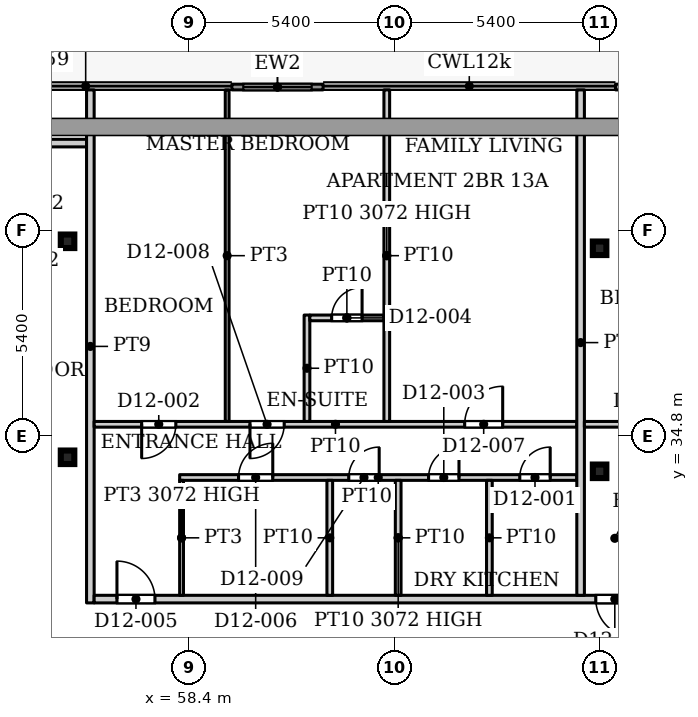
"""IFC4 building model, lengths in metres.
Left out: names, types, materials, properties, quantities, classifications, styles, units other than length and angle.
Written with IfcOpenShell. Run it as: python <this file> out.ifc"""

import sys

from ifc_helpers import new_model, si_unit, direction, frame, frame_2d, origin, origin_2d, place, context, subcontext, project, spatial, rectangle, hollow_rectangle, extrude, source, transform, mapped, element, fill, save


model = new_model("IFC4")
c1 = context("Model", 3, precision=1e-05, world=origin(), true_north=direction((0.0, 1.0)))
c2 = subcontext(c1, "Body", "Model", "MODEL_VIEW")
j1 = project(units=[si_unit("LENGTHUNIT", "METRE"), si_unit("PLANEANGLEUNIT", "RADIAN")], contexts=[c1])
p1 = place(None, origin())
s1 = spatial("IfcSite", under=j1, at=p1, CompositionType="ELEMENT")
p2 = place(p1, origin())
s2 = spatial("IfcBuilding", under=s1, at=p2, CompositionType="ELEMENT")
p3 = place(p2, frame((0.0, 0.0, 57.8)))
s3 = spatial("IfcBuildingStorey", under=s2, at=p3, CompositionType="ELEMENT", Elevation=57.8)
for number, where, z_axis, x_axis in (
    (1, (69.2, 33.863, 0.0), (0.0, 0.0, 1.0), (1.0, 0.0, 0.0)),
    (2, (55.2, 34.232, 0.0), (0.0, 0.0, 1.0), (1.0, 0.0, 0.0)),
    (3, (69.2, 39.732, 0.0), (0.0, 0.0, 1.0), (1.0, 0.0, 0.0)),
    (4, (55.2, 39.916, 0.0), (0.0, 0.0, 1.0), (1.0, 0.0, 0.0)),
):
    element("IfcColumn", number, at=place(p3, frame(where, z_axis=z_axis, x_axis=x_axis)), inside=s3, PredefinedType="COLUMN", context=c2, shape_type="SweptSolid", body=[
        extrude(hollow_rectangle(XDim=0.356, YDim=0.356, WallThickness=0.016, InnerFilletRadius=0.016, OuterFilletRadius=0.032, at=origin_2d()), origin(), (0.0, 0.0, 1.0), 3.9),
    ])
p4 = place(p3, frame((59.524, 43.975, 0.0), z_axis=(0.0, 0.0, 1.0), x_axis=(1.0, 0.0, 0.0)))
e5 = element("IfcWall", 5, at=p4, inside=s3, PredefinedType="SOLIDWALL", context=c2, shape_type="SweptSolid", body=[
    extrude(rectangle(XDim=2.4, YDim=0.15, at=frame_2d((1.2, 0.0))), origin(), (0.0, 0.0, 1.0), 3.75),
])
p5 = place(p4, frame((0.3, 0.0, 0.0)))
e6 = element("IfcOpeningElement", 6, at=p5, cuts=e5, PredefinedType="OPENING", context=c2, shape_type="SweptSolid", body=[
    extrude(rectangle(XDim=1.8, YDim=2.4, at=frame_2d((0.9, 1.2))), frame((0.0, 0.085, 0.0), z_axis=(0.0, -1.0, 0.0), x_axis=(1.0, 0.0, 0.0)), (0.0, 0.0, 1.0), 0.17),
])
p6 = place(p3, frame((69.618, 43.975, 0.0), z_axis=(0.0, 0.0, 1.0), x_axis=(1.0, 0.0, 0.0)))
e7 = element("IfcWall", 7, at=p6, inside=s3, PredefinedType="SOLIDWALL", context=c2, shape_type="SweptSolid", body=[
    extrude(rectangle(XDim=2.4, YDim=0.15, at=frame_2d((1.2, 0.0))), origin(), (0.0, 0.0, 1.0), 3.75),
])
p7 = place(p6, frame((0.3, 0.0, 0.0)))
e8 = element("IfcOpeningElement", 8, at=p7, cuts=e7, PredefinedType="OPENING", context=c2, shape_type="SweptSolid", body=[
    extrude(rectangle(XDim=1.8, YDim=2.4, at=frame_2d((0.9, 1.2))), frame((0.0, 0.085, 0.0), z_axis=(0.0, -1.0, 0.0), x_axis=(1.0, 0.0, 0.0)), (0.0, 0.0, 1.0), 0.17),
])
p8 = place(p3, frame((53.5, 42.5, 0.0), z_axis=(0.0, 0.0, 1.0), x_axis=(1.0, 0.0, 0.0)))
e9 = element("IfcWall", 9, at=p8, inside=s3, PredefinedType="PARTITIONING", context=c2, shape_type="SweptSolid", body=[
    extrude(rectangle(XDim=2.2, YDim=0.2, at=frame_2d((1.1, 0.0))), origin(), (0.0, 0.0, 1.0), 3.6),
])
p9 = place(p8, frame((0.15, 0.0, 0.0)))
e10 = element("IfcOpeningElement", 10, at=p9, cuts=e9, PredefinedType="OPENING", context=c2, shape_type="SweptSolid", body=[
    extrude(rectangle(XDim=1.0, YDim=2.1, at=frame_2d((0.5, 1.05))), frame((0.0, 0.11, 0.0), z_axis=(0.0, -1.0, 0.0), x_axis=(1.0, 0.0, 0.0)), (0.0, 0.0, 1.0), 0.22),
])
p10 = place(p3, frame((55.8, 30.4, 0.0), z_axis=(0.0, 0.0, 1.0), x_axis=(0.0, 1.0, 0.0)))
e11 = element("IfcWall", 11, at=p10, inside=s3, PredefinedType="PARTITIONING", context=c2, shape_type="SweptSolid", body=[
    extrude(rectangle(XDim=13.5, YDim=0.2, at=frame_2d((6.75, 0.0))), origin(), (0.0, 0.0, 1.0), 3.6),
])
p11 = place(p3, frame((55.9, 30.5, 0.0), z_axis=(0.0, 0.0, 1.0), x_axis=(1.0, 0.0, 0.0)))
e12 = element("IfcWall", 12, at=p11, inside=s3, PredefinedType="PARTITIONING", context=c2, shape_type="SweptSolid", body=[
    extrude(rectangle(XDim=42.2, YDim=0.2, at=frame_2d((21.1, 0.0))), origin(), (0.0, 0.0, 1.0), 3.6),
])
p12 = place(p11, frame((0.6, 0.0, 0.0)))
e13 = element("IfcOpeningElement", 13, at=p12, cuts=e12, PredefinedType="OPENING", context=c2, shape_type="SweptSolid", body=[
    extrude(rectangle(XDim=1.0, YDim=2.1, at=frame_2d((0.5, 1.05))), frame((0.0, 0.11, 0.0), z_axis=(0.0, -1.0, 0.0), x_axis=(1.0, 0.0, 0.0)), (0.0, 0.0, 1.0), 0.22),
])
p13 = place(p11, frame((13.2, 0.0, 0.0)))
e14 = element("IfcOpeningElement", 14, at=p13, cuts=e12, PredefinedType="OPENING", context=c2, shape_type="SweptSolid", body=[
    extrude(rectangle(XDim=1.0, YDim=2.1, at=frame_2d((0.5, 1.05))), frame((0.0, 0.11, 0.0), z_axis=(0.0, -1.0, 0.0), x_axis=(1.0, 0.0, 0.0)), (0.0, 0.0, 1.0), 0.22),
])
p14 = place(p11, frame((22.8, 0.0, 0.0)))
e15 = element("IfcOpeningElement", 15, at=p14, cuts=e12, PredefinedType="OPENING", context=c2, shape_type="SweptSolid", body=[
    extrude(rectangle(XDim=1.0, YDim=2.1, at=frame_2d((0.5, 1.05))), frame((0.0, 0.11, 0.0), z_axis=(0.0, -1.0, 0.0), x_axis=(1.0, 0.0, 0.0)), (0.0, 0.0, 1.0), 0.22),
])
p15 = place(p11, frame((34.65, 0.0, 0.0)))
e16 = element("IfcOpeningElement", 16, at=p15, cuts=e12, PredefinedType="OPENING", context=c2, shape_type="SweptSolid", body=[
    extrude(rectangle(XDim=1.0, YDim=2.1, at=frame_2d((0.5, 1.05))), frame((0.0, 0.11, 0.0), z_axis=(0.0, -1.0, 0.0), x_axis=(1.0, 0.0, 0.0)), (0.0, 0.0, 1.0), 0.22),
])
p16 = place(p3, frame((55.9, 35.1, 0.0), z_axis=(0.0, 0.0, 1.0), x_axis=(1.0, 0.0, 0.0)))
e17 = element("IfcWall", 17, at=p16, inside=s3, PredefinedType="PARTITIONING", context=c2, shape_type="SweptSolid", body=[
    extrude(rectangle(XDim=12.7, YDim=0.15, at=frame_2d((6.35, 0.0))), origin(), (0.0, 0.0, 1.0), 3.6),
])
p17 = place(p16, frame((1.25, 0.0, 0.0)))
e18 = element("IfcOpeningElement", 18, at=p17, cuts=e17, PredefinedType="OPENING", context=c2, shape_type="SweptSolid", body=[
    extrude(rectangle(XDim=0.9, YDim=2.1, at=frame_2d((0.45, 1.05))), frame((0.0, 0.085, 0.0), z_axis=(0.0, -1.0, 0.0), x_axis=(1.0, 0.0, 0.0)), (0.0, 0.0, 1.0), 0.17),
])
p18 = place(p16, frame((9.75, 0.0, 0.0)))
e19 = element("IfcOpeningElement", 19, at=p18, cuts=e17, PredefinedType="OPENING", context=c2, shape_type="SweptSolid", body=[
    extrude(rectangle(XDim=1.0, YDim=2.1, at=frame_2d((0.5, 1.05))), frame((0.0, 0.085, 0.0), z_axis=(0.0, -1.0, 0.0), x_axis=(1.0, 0.0, 0.0)), (0.0, 0.0, 1.0), 0.17),
])
p19 = place(p16, frame((4.1, 0.0, 0.0)))
e20 = element("IfcOpeningElement", 20, at=p19, cuts=e17, PredefinedType="OPENING", context=c2, shape_type="SweptSolid", body=[
    extrude(rectangle(XDim=0.9, YDim=2.1, at=frame_2d((0.45, 1.05))), frame((0.0, 0.085, 0.0), z_axis=(0.0, -1.0, 0.0), x_axis=(1.0, 0.0, 0.0)), (0.0, 0.0, 1.0), 0.17),
])
p20 = place(p3, frame((58.15, 33.7, 0.0), z_axis=(0.0, 0.0, 1.0), x_axis=(1.0, 0.0, 0.0)))
e21 = element("IfcWall", 21, at=p20, inside=s3, PredefinedType="PARTITIONING", context=c2, shape_type="SweptSolid", body=[
    extrude(rectangle(XDim=10.45, YDim=0.15, at=frame_2d((5.225, 0.0))), origin(), (0.0, 0.0, 1.0), 3.6),
])
p21 = place(p20, frame((8.95, 0.0, 0.0)))
e22 = element("IfcOpeningElement", 22, at=p21, cuts=e21, PredefinedType="OPENING", context=c2, shape_type="SweptSolid", body=[
    extrude(rectangle(XDim=0.8, YDim=2.1, at=frame_2d((0.4, 1.05))), frame((0.0, 0.085, 0.0), z_axis=(0.0, -1.0, 0.0), x_axis=(1.0, 0.0, 0.0)), (0.0, 0.0, 1.0), 0.17),
])
p22 = place(p20, frame((6.55, 0.0, 0.0)))
e23 = element("IfcOpeningElement", 23, at=p22, cuts=e21, PredefinedType="OPENING", context=c2, shape_type="SweptSolid", body=[
    extrude(rectangle(XDim=0.8, YDim=2.1, at=frame_2d((0.4, 1.05))), frame((0.0, 0.085, 0.0), z_axis=(0.0, -1.0, 0.0), x_axis=(1.0, 0.0, 0.0)), (0.0, 0.0, 1.0), 0.17),
])
p23 = place(p20, frame((1.55, 0.0, 0.0)))
e24 = element("IfcOpeningElement", 24, at=p23, cuts=e21, PredefinedType="OPENING", context=c2, shape_type="SweptSolid", body=[
    extrude(rectangle(XDim=0.9, YDim=2.1, at=frame_2d((0.45, 1.05))), frame((0.0, 0.085, 0.0), z_axis=(0.0, -1.0, 0.0), x_axis=(1.0, 0.0, 0.0)), (0.0, 0.0, 1.0), 0.17),
])
p24 = place(p20, frame((4.45, 0.0, 0.0)))
e25 = element("IfcOpeningElement", 25, at=p24, cuts=e21, PredefinedType="OPENING", context=c2, shape_type="SweptSolid", body=[
    extrude(rectangle(XDim=0.8, YDim=2.1, at=frame_2d((0.4, 1.05))), frame((0.0, 0.085, 0.0), z_axis=(0.0, -1.0, 0.0), x_axis=(1.0, 0.0, 0.0)), (0.0, 0.0, 1.0), 0.17),
])
p25 = place(p3, frame((58.2, 30.6, 0.0), z_axis=(0.0, 0.0, 1.0), x_axis=(0.0, 1.0, 0.0)))
e26 = element("IfcWall", 26, at=p25, inside=s3, PredefinedType="PARTITIONING", context=c2, shape_type="SweptSolid", body=[
    extrude(rectangle(XDim=3.025, YDim=0.1, at=frame_2d((1.512, 0.0))), origin(), (0.0, 0.0, 1.0), 3.072),
])
p26 = place(p3, frame((59.4, 35.175, 0.0), z_axis=(0.0, 0.0, 1.0), x_axis=(0.0, 1.0, 0.0)))
e27 = element("IfcWall", 27, at=p26, inside=s3, PredefinedType="PARTITIONING", context=c2, shape_type="SweptSolid", body=[
    extrude(rectangle(XDim=8.725, YDim=0.1, at=frame_2d((4.362, 0.0))), origin(), (0.0, 0.0, 1.0), 3.6),
])
p27 = place(p3, frame((61.5, 35.175, 0.0), z_axis=(0.0, 0.0, 1.0), x_axis=(0.0, 1.0, 0.0)))
e28 = element("IfcWall", 28, at=p27, inside=s3, PredefinedType="PARTITIONING", context=c2, shape_type="SweptSolid", body=[
    extrude(rectangle(XDim=2.8, YDim=0.15, at=frame_2d((1.4, 0.0))), origin(), (0.0, 0.0, 1.0), 3.6),
])
p28 = place(p3, frame((61.575, 37.9, 0.0), z_axis=(0.0, 0.0, 1.0), x_axis=(1.0, 0.0, 0.0)))
e29 = element("IfcWall", 29, at=p28, inside=s3, PredefinedType="PARTITIONING", context=c2, shape_type="SweptSolid", body=[
    extrude(rectangle(XDim=1.95, YDim=0.15, at=frame_2d((0.975, 0.0))), origin(), (0.0, 0.0, 1.0), 3.6),
])
p29 = place(p28, frame((0.575, 0.0, 0.0)))
e30 = element("IfcOpeningElement", 30, at=p29, cuts=e29, PredefinedType="OPENING", context=c2, shape_type="SweptSolid", body=[
    extrude(rectangle(XDim=0.8, YDim=2.1, at=frame_2d((0.4, 1.05))), frame((0.0, 0.085, 0.0), z_axis=(0.0, -1.0, 0.0), x_axis=(1.0, 0.0, 0.0)), (0.0, 0.0, 1.0), 0.17),
])
p30 = place(p3, frame((62.1, 30.6, 0.0), z_axis=(0.0, 0.0, 1.0), x_axis=(0.0, 1.0, 0.0)))
e31 = element("IfcWall", 31, at=p30, inside=s3, PredefinedType="PARTITIONING", context=c2, shape_type="SweptSolid", body=[
    extrude(rectangle(XDim=3.025, YDim=0.15, at=frame_2d((1.512, 0.0))), origin(), (0.0, 0.0, 1.0), 3.6),
])
p31 = place(p3, frame((63.6, 35.175, 0.0), z_axis=(0.0, 0.0, 1.0), x_axis=(0.0, 1.0, 0.0)))
e32 = element("IfcWall", 32, at=p31, inside=s3, PredefinedType="PARTITIONING", context=c2, shape_type="SweptSolid", body=[
    extrude(rectangle(XDim=8.725, YDim=0.15, at=frame_2d((4.362, 0.0))), origin(), (0.0, 0.0, 1.0), 3.072),
])
p32 = place(p3, frame((63.9, 30.6, 0.0), z_axis=(0.0, 0.0, 1.0), x_axis=(0.0, 1.0, 0.0)))
e33 = element("IfcWall", 33, at=p32, inside=s3, PredefinedType="PARTITIONING", context=c2, shape_type="SweptSolid", body=[
    extrude(rectangle(XDim=3.025, YDim=0.15, at=frame_2d((1.512, 0.0))), origin(), (0.0, 0.0, 1.0), 3.072),
])
p33 = place(p3, frame((66.3, 30.6, 0.0), z_axis=(0.0, 0.0, 1.0), x_axis=(0.0, 1.0, 0.0)))
e34 = element("IfcWall", 34, at=p33, inside=s3, PredefinedType="PARTITIONING", context=c2, shape_type="SweptSolid", body=[
    extrude(rectangle(XDim=3.025, YDim=0.15, at=frame_2d((1.512, 0.0))), origin(), (0.0, 0.0, 1.0), 3.6),
])
p34 = place(p3, frame((68.7, 30.6, 0.0), z_axis=(0.0, 0.0, 1.0), x_axis=(0.0, 1.0, 0.0)))
e35 = element("IfcWall", 35, at=p34, inside=s3, PredefinedType="PARTITIONING", context=c2, shape_type="SweptSolid", body=[
    extrude(rectangle(XDim=13.3, YDim=0.2, at=frame_2d((6.65, 0.0))), origin(), (0.0, 0.0, 1.0), 3.6),
])
p35 = place(p3, frame((68.8, 35.1, 0.0), z_axis=(0.0, 0.0, 1.0), x_axis=(1.0, 0.0, 0.0)))
e36 = element("IfcWall", 36, at=p35, inside=s3, PredefinedType="PARTITIONING", context=c2, shape_type="SweptSolid", body=[
    extrude(rectangle(XDim=9.1, YDim=0.15, at=frame_2d((4.55, 0.0))), origin(), (0.0, 0.0, 1.0), 3.6),
])
p36 = place(p35, frame((1.4, 0.0, 0.0)))
e37 = element("IfcOpeningElement", 37, at=p36, cuts=e36, PredefinedType="OPENING", context=c2, shape_type="SweptSolid", body=[
    extrude(rectangle(XDim=0.9, YDim=2.1, at=frame_2d((0.45, 1.05))), frame((0.0, 0.085, 0.0), z_axis=(0.0, -1.0, 0.0), x_axis=(1.0, 0.0, 0.0)), (0.0, 0.0, 1.0), 0.17),
])
p37 = place(p35, frame((6.0, 0.0, 0.0)))
e38 = element("IfcOpeningElement", 38, at=p37, cuts=e36, PredefinedType="OPENING", context=c2, shape_type="SweptSolid", body=[
    extrude(rectangle(XDim=1.0, YDim=2.1, at=frame_2d((0.5, 1.05))), frame((0.0, 0.085, 0.0), z_axis=(0.0, -1.0, 0.0), x_axis=(1.0, 0.0, 0.0)), (0.0, 0.0, 1.0), 0.17),
])
m1 = source(origin(), c2, "Body", "SweptSolid", [
    extrude(rectangle(XDim=1.8, YDim=2.4, at=frame_2d((0.9, 1.2))), frame((0.0, 0.025, 0.0), z_axis=(0.0, -1.0, 0.0), x_axis=(1.0, 0.0, 0.0)), (0.0, 0.0, 1.0), 0.05),
])
p38 = place(p5, origin())
e39 = element("IfcDoor", 39, at=p38, inside=s3, OperationType="SLIDING_TO_LEFT", PredefinedType="DOOR", context=c2, shape_type="MappedRepresentation", body=[
    mapped(m1, transform((0.0, 0.0, 0.0), x_axis=(1.0, 0.0, 0.0), y_axis=(0.0, 1.0, 0.0), z_axis=(0.0, 0.0, 1.0), scale=1.0)),
])
fill(e6, e39)
m2 = source(origin(), c2, "Body", "SweptSolid", [
    extrude(rectangle(XDim=0.8, YDim=2.1, at=frame_2d((0.4, 1.05))), frame((0.0, 0.025, 0.0), z_axis=(0.0, -1.0, 0.0), x_axis=(1.0, 0.0, 0.0)), (0.0, 0.0, 1.0), 0.05),
])
p39 = place(p21, origin())
e40 = element("IfcDoor", 40, at=p39, inside=s3, OperationType="SINGLE_SWING_LEFT", PredefinedType="DOOR", context=c2, shape_type="MappedRepresentation", body=[
    mapped(m2, transform((0.0, 0.0, 0.0), x_axis=(1.0, 0.0, 0.0), y_axis=(0.0, 1.0, 0.0), z_axis=(0.0, 0.0, 1.0), scale=1.0)),
])
fill(e22, e40)
m3 = source(origin(), c2, "Body", "SweptSolid", [
    extrude(rectangle(XDim=0.9, YDim=2.1, at=frame_2d((0.45, 1.05))), frame((0.0, 0.025, 0.0), z_axis=(0.0, -1.0, 0.0), x_axis=(1.0, 0.0, 0.0)), (0.0, 0.0, 1.0), 0.05),
])
p40 = place(p17, origin())
e41 = element("IfcDoor", 41, at=p40, inside=s3, OperationType="SINGLE_SWING_RIGHT", PredefinedType="DOOR", context=c2, shape_type="MappedRepresentation", body=[
    mapped(m3, transform((0.0, 0.0, 0.0), x_axis=(1.0, 0.0, 0.0), y_axis=(0.0, 1.0, 0.0), z_axis=(0.0, 0.0, 1.0), scale=1.0)),
])
fill(e18, e41)
p41 = place(p22, origin())
e42 = element("IfcDoor", 42, at=p41, inside=s3, OperationType="SINGLE_SWING_LEFT", PredefinedType="DOOR", context=c2, shape_type="MappedRepresentation", body=[
    mapped(m2, transform((0.0, 0.0, 0.0), x_axis=(1.0, 0.0, 0.0), y_axis=(0.0, 1.0, 0.0), z_axis=(0.0, 0.0, 1.0), scale=1.0)),
])
fill(e23, e42)
p42 = place(p29, origin())
e43 = element("IfcDoor", 43, at=p42, inside=s3, OperationType="SINGLE_SWING_LEFT", PredefinedType="DOOR", context=c2, shape_type="MappedRepresentation", body=[
    mapped(m2, transform((0.0, 0.0, 0.0), x_axis=(1.0, 0.0, 0.0), y_axis=(0.0, 1.0, 0.0), z_axis=(0.0, 0.0, 1.0), scale=1.0)),
])
fill(e30, e43)
m4 = source(origin(), c2, "Body", "SweptSolid", [
    extrude(rectangle(XDim=1.0, YDim=2.1, at=frame_2d((0.5, 1.05))), frame((0.0, 0.025, 0.0), z_axis=(0.0, -1.0, 0.0), x_axis=(1.0, 0.0, 0.0)), (0.0, 0.0, 1.0), 0.05),
])
p43 = place(p12, origin())
e44 = element("IfcDoor", 44, at=p43, inside=s3, OperationType="SINGLE_SWING_LEFT", PredefinedType="DOOR", context=c2, shape_type="MappedRepresentation", body=[
    mapped(m4, transform((0.0, 0.0, 0.0), x_axis=(1.0, 0.0, 0.0), y_axis=(0.0, 1.0, 0.0), z_axis=(0.0, 0.0, 1.0), scale=1.0)),
])
fill(e13, e44)
p44 = place(p23, origin())
e45 = element("IfcDoor", 45, at=p44, inside=s3, OperationType="SINGLE_SWING_LEFT", PredefinedType="DOOR", context=c2, shape_type="MappedRepresentation", body=[
    mapped(m3, transform((0.0, 0.0, 0.0), x_axis=(1.0, 0.0, 0.0), y_axis=(0.0, 1.0, 0.0), z_axis=(0.0, 0.0, 1.0), scale=1.0)),
])
fill(e24, e45)
m5 = source(origin(), c2, "Body", "SweptSolid", [
    extrude(rectangle(XDim=1.0, YDim=2.1, at=frame_2d((0.5, 1.05))), frame((0.0, 0.025, 0.0), z_axis=(0.0, -1.0, 0.0), x_axis=(1.0, 0.0, 0.0)), (0.0, 0.0, 1.0), 0.05),
])
p45 = place(p18, origin())
e46 = element("IfcDoor", 46, at=p45, inside=s3, OperationType="SINGLE_SWING_LEFT", PredefinedType="DOOR", context=c2, shape_type="MappedRepresentation", body=[
    mapped(m5, transform((0.0, 0.0, 0.0), x_axis=(1.0, 0.0, 0.0), y_axis=(0.0, 1.0, 0.0), z_axis=(0.0, 0.0, 1.0), scale=1.0)),
])
fill(e19, e46)
p46 = place(p19, origin())
e47 = element("IfcDoor", 47, at=p46, inside=s3, OperationType="SINGLE_SWING_RIGHT", PredefinedType="DOOR", context=c2, shape_type="MappedRepresentation", body=[
    mapped(m3, transform((0.0, 0.0, 0.0), x_axis=(1.0, 0.0, 0.0), y_axis=(0.0, 1.0, 0.0), z_axis=(0.0, 0.0, 1.0), scale=1.0)),
])
fill(e20, e47)
p47 = place(p24, origin())
e48 = element("IfcDoor", 48, at=p47, inside=s3, OperationType="SINGLE_SWING_LEFT", PredefinedType="DOOR", context=c2, shape_type="MappedRepresentation", body=[
    mapped(m2, transform((0.0, 0.0, 0.0), x_axis=(1.0, 0.0, 0.0), y_axis=(0.0, 1.0, 0.0), z_axis=(0.0, 0.0, 1.0), scale=1.0)),
])
fill(e25, e48)
p48 = place(p13, origin())
e49 = element("IfcDoor", 49, at=p48, inside=s3, OperationType="SINGLE_SWING_RIGHT", PredefinedType="DOOR", context=c2, shape_type="MappedRepresentation", body=[
    mapped(m4, transform((0.0, 0.0, 0.0), x_axis=(1.0, 0.0, 0.0), y_axis=(0.0, 1.0, 0.0), z_axis=(0.0, 0.0, 1.0), scale=1.0)),
])
fill(e14, e49)
save(model, sys.argv[1])
